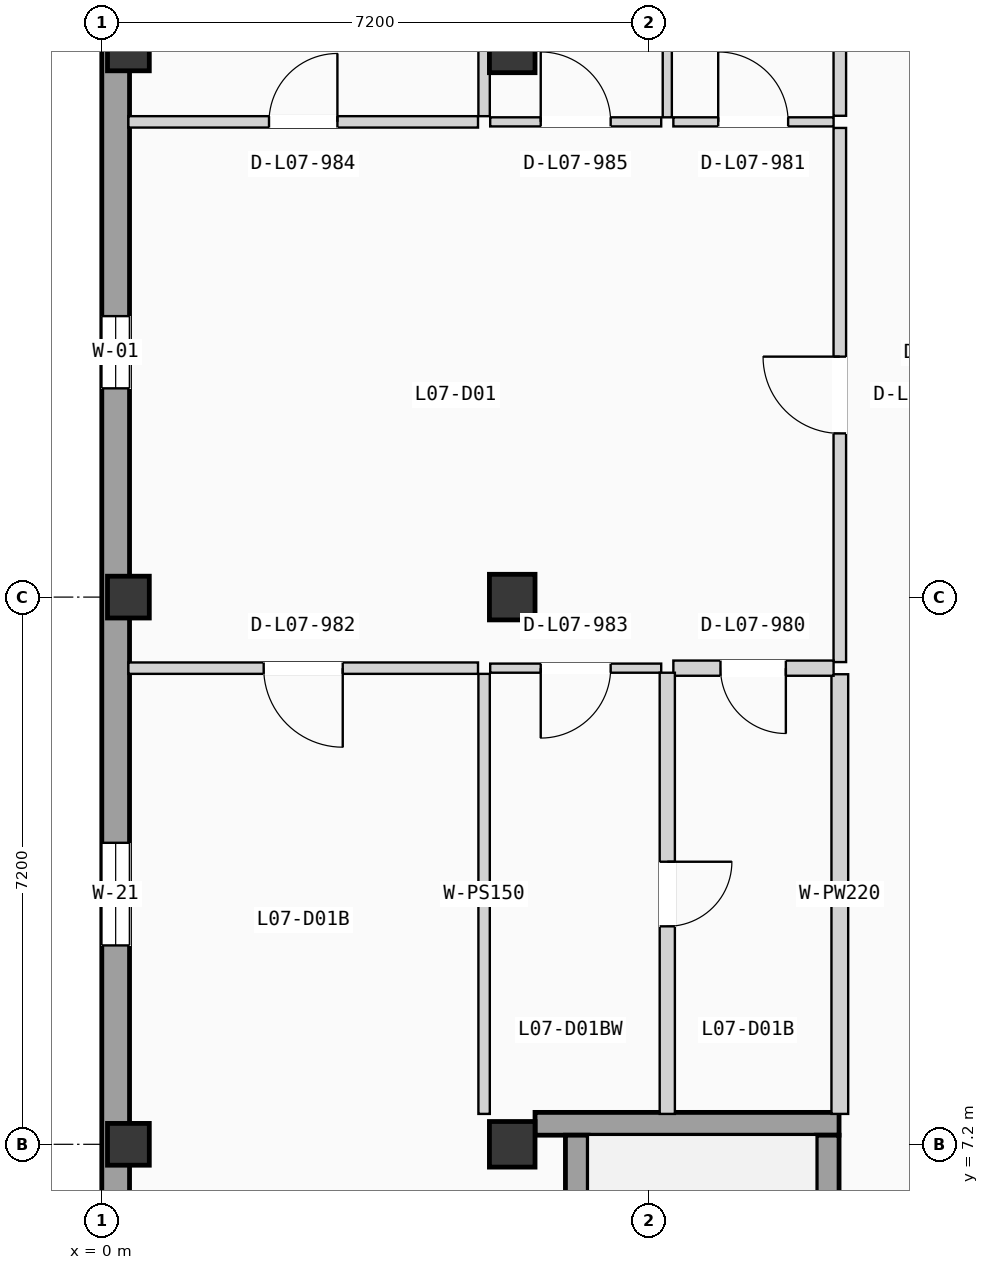
"""IFC4 building model, lengths in metres.
Left out: names, types, materials, properties, quantities, classifications, styles, units other than length and angle.
Written with IfcOpenShell. Run it as: python <this file> out.ifc"""

import sys

from ifc_helpers import new_model, si_unit, direction, frame, frame_2d, origin, origin_2d, place, context, subcontext, project, spatial, rectangle, extrude, element, fill, save


model = new_model("IFC4")
c1 = context("Model", 3, precision=1e-05, world=origin(), true_north=direction((0.0, 1.0)))
c2 = subcontext(c1, "Body", "Model", "MODEL_VIEW")
j1 = project(units=[si_unit("LENGTHUNIT", "METRE"), si_unit("PLANEANGLEUNIT", "RADIAN")], contexts=[c1])
p1 = place(None, origin())
s1 = spatial("IfcSite", under=j1, at=p1, CompositionType="ELEMENT")
p2 = place(p1, origin())
s2 = spatial("IfcBuilding", under=s1, at=p2, CompositionType="ELEMENT")
p3 = place(p2, frame((0.0, 0.0, 24.675)))
s3 = spatial("IfcBuildingStorey", under=s2, at=p3, CompositionType="ELEMENT", Elevation=24.675)
for number, where, z_axis, x_axis in (
    (1, (0.35, 7.2, 0.0), (0.0, 0.0, 1.0), (1.0, 0.0, 0.0)),
    (2, (0.35, 14.4, 0.0), (0.0, 0.0, 1.0), (1.0, 0.0, 0.0)),
    (3, (0.35, 21.6, 0.0), (0.0, 0.0, 1.0), (1.0, 0.0, 0.0)),
):
    element("IfcColumn", number, at=place(p3, frame(where, z_axis=z_axis, x_axis=x_axis)), inside=s3, PredefinedType="COLUMN", context=c2, shape_type="SweptSolid", body=[
        extrude(rectangle(XDim=0.55, YDim=0.55, at=origin_2d()), origin(), (0.0, 0.0, 1.0), 3.15),
    ])
for number, where, z_axis, x_axis in (
    (4, (5.4, 7.2, 0.0), (0.0, 0.0, 1.0), (1.0, 0.0, 0.0)),
    (5, (5.4, 14.4, 0.0), (0.0, 0.0, 1.0), (1.0, 0.0, 0.0)),
    (6, (5.4, 21.6, 0.0), (0.0, 0.0, 1.0), (1.0, 0.0, 0.0)),
):
    element("IfcColumn", number, at=place(p3, frame(where, z_axis=z_axis, x_axis=x_axis)), inside=s3, PredefinedType="COLUMN", context=c2, shape_type="SweptSolid", body=[
        extrude(rectangle(XDim=0.6, YDim=0.6, at=origin_2d()), origin(), (0.0, 0.0, 1.0), 3.15),
    ])
p4 = place(p3, frame((0.183, 0.365, 0.0), z_axis=(0.0, 0.0, 1.0), x_axis=(0.0, 1.0, 0.0)))
e7 = element("IfcWall", 7, at=p4, inside=s3, PredefinedType="SOLIDWALL", context=c2, shape_type="SweptSolid", body=[
    extrude(rectangle(XDim=49.67, YDim=0.365, at=frame_2d((24.835, 0.0))), origin(), (0.0, 0.0, 1.0), 2.6),
])
p5 = place(p4, frame((16.782, 0.0, 0.85)))
e8 = element("IfcOpeningElement", 8, at=p5, cuts=e7, PredefinedType="OPENING", context=c2, shape_type="SweptSolid", body=[
    extrude(rectangle(XDim=0.95, YDim=1.2, at=frame_2d((0.475, 0.6))), frame((0.0, 0.192, 0.0), z_axis=(0.0, -1.0, 0.0), x_axis=(1.0, 0.0, 0.0)), (0.0, 0.0, 1.0), 0.385),
])
p6 = place(p4, frame((9.452, 0.0, 0.9)))
e9 = element("IfcOpeningElement", 9, at=p6, cuts=e7, PredefinedType="OPENING", context=c2, shape_type="SweptSolid", body=[
    extrude(rectangle(XDim=1.35, YDim=1.2, at=frame_2d((0.675, 0.6))), frame((0.0, 0.192, 0.0), z_axis=(0.0, -1.0, 0.0), x_axis=(1.0, 0.0, 0.0)), (0.0, 0.0, 1.0), 0.385),
])
p7 = place(p4, frame((23.154, 0.0, 0.815)))
e10 = element("IfcOpeningElement", 10, at=p7, cuts=e7, PredefinedType="OPENING", context=c2, shape_type="SweptSolid", body=[
    extrude(rectangle(XDim=1.35, YDim=1.35, at=frame_2d((0.675, 0.675))), frame((0.0, 0.192, 0.0), z_axis=(0.0, -1.0, 0.0), x_axis=(1.0, 0.0, 0.0)), (0.0, 0.0, 1.0), 0.385),
])
p8 = place(p4, frame((32.71, 0.0, 0.665)))
e11 = element("IfcOpeningElement", 11, at=p8, cuts=e7, PredefinedType="OPENING", context=c2, shape_type="SweptSolid", body=[
    extrude(rectangle(XDim=1.35, YDim=1.5, at=frame_2d((0.675, 0.75))), frame((0.0, 0.192, 0.0), z_axis=(0.0, -1.0, 0.0), x_axis=(1.0, 0.0, 0.0)), (0.0, 0.0, 1.0), 0.385),
])
p9 = place(p4, frame((29.3, 0.0, 0.515)))
e12 = element("IfcOpeningElement", 12, at=p9, cuts=e7, PredefinedType="OPENING", context=c2, shape_type="SweptSolid", body=[
    extrude(rectangle(XDim=1.35, YDim=1.65, at=frame_2d((0.675, 0.825))), frame((0.0, 0.192, 0.0), z_axis=(0.0, -1.0, 0.0), x_axis=(1.0, 0.0, 0.0)), (0.0, 0.0, 1.0), 0.385),
])
p10 = place(p4, frame((39.504, 0.0, 0.85)))
e13 = element("IfcOpeningElement", 13, at=p10, cuts=e7, PredefinedType="OPENING", context=c2, shape_type="SweptSolid", body=[
    extrude(rectangle(XDim=0.95, YDim=1.2, at=frame_2d((0.475, 0.6))), frame((0.0, 0.192, 0.0), z_axis=(0.0, -1.0, 0.0), x_axis=(1.0, 0.0, 0.0)), (0.0, 0.0, 1.0), 0.385),
])
p11 = place(p3, frame((5.7, 7.47, 0.0), z_axis=(0.0, 0.0, 1.0), x_axis=(1.0, 0.0, 0.0)))
e14 = element("IfcWall", 14, at=p11, inside=s3, PredefinedType="SHEAR", context=c2, shape_type="SweptSolid", body=[
    extrude(rectangle(XDim=4.0, YDim=0.3, at=frame_2d((2.0, 0.0))), origin(), (0.0, 0.0, 1.0), 2.9),
])
p12 = place(p3, frame((6.25, 0.32, 0.0), z_axis=(0.0, 0.0, 1.0), x_axis=(0.0, 1.0, 0.0)))
e15 = element("IfcWall", 15, at=p12, inside=s3, PredefinedType="SHEAR", context=c2, shape_type="SweptSolid", body=[
    extrude(rectangle(XDim=7.0, YDim=0.3, at=frame_2d((3.5, 0.0))), origin(), (0.0, 0.0, 1.0), 2.9),
])
p13 = place(p3, frame((9.55, 0.32, 0.0), z_axis=(0.0, 0.0, 1.0), x_axis=(0.0, 1.0, 0.0)))
e16 = element("IfcWall", 16, at=p13, inside=s3, PredefinedType="SHEAR", context=c2, shape_type="SweptSolid", body=[
    extrude(rectangle(XDim=7.0, YDim=0.3, at=frame_2d((3.5, 0.0))), origin(), (0.0, 0.0, 1.0), 2.9),
])
p14 = place(p13, frame((0.225, 0.0, 0.0)))
e17 = element("IfcOpeningElement", 17, at=p14, cuts=e16, PredefinedType="OPENING", context=c2, shape_type="SweptSolid", body=[
    extrude(rectangle(XDim=1.15, YDim=2.12, at=frame_2d((0.575, 1.06))), frame((0.0, 0.16, 0.0), z_axis=(0.0, -1.0, 0.0), x_axis=(1.0, 0.0, 0.0)), (0.0, 0.0, 1.0), 0.32),
])
p15 = place(p3, frame((9.71, 13.545, 0.0), z_axis=(0.0, 0.0, 1.0), x_axis=(0.0, 1.0, 0.0)))
e18 = element("IfcWall", 18, at=p15, inside=s3, PredefinedType="PARTITIONING", context=c2, shape_type="SweptSolid", body=[
    extrude(rectangle(XDim=7.028, YDim=0.165, at=frame_2d((3.514, 0.0))), origin(), (0.0, 0.0, 1.0), 2.87),
])
p16 = place(p15, frame((3.009, 0.0, 0.0)))
e19 = element("IfcOpeningElement", 19, at=p16, cuts=e18, PredefinedType="OPENING", context=c2, shape_type="SweptSolid", body=[
    extrude(rectangle(XDim=1.01, YDim=2.11, at=frame_2d((0.505, 1.055))), frame((0.0, 0.093, 0.0), z_axis=(0.0, -1.0, 0.0), x_axis=(1.0, 0.0, 0.0)), (0.0, 0.0, 1.0), 0.185),
])
p17 = place(p3, frame((9.71, 7.6, 0.0), z_axis=(0.0, 0.0, 1.0), x_axis=(0.0, 1.0, 0.0)))
e20 = element("IfcWall", 20, at=p17, inside=s3, PredefinedType="PLUMBINGWALL", context=c2, shape_type="SweptSolid", body=[
    extrude(rectangle(XDim=5.785, YDim=0.22, at=frame_2d((2.893, 0.0))), origin(), (0.0, 0.0, 1.0), 2.87),
])
p18 = place(p3, frame((9.71, 20.733, 0.0), z_axis=(0.0, 0.0, 1.0), x_axis=(0.0, 1.0, 0.0)))
e21 = element("IfcWall", 21, at=p18, inside=s3, PredefinedType="PARTITIONING", context=c2, shape_type="SweptSolid", body=[
    extrude(rectangle(XDim=5.785, YDim=0.165, at=frame_2d((2.893, 0.0))), origin(), (0.0, 0.0, 1.0), 2.87),
])
p19 = place(p3, frame((7.52, 13.465, 0.0), z_axis=(0.0, 0.0, 1.0), x_axis=(1.0, 0.0, 0.0)))
e22 = element("IfcWall", 22, at=p19, inside=s3, PredefinedType="PLUMBINGWALL", context=c2, shape_type="SweptSolid", body=[
    extrude(rectangle(XDim=2.108, YDim=0.2, at=frame_2d((1.054, 0.0))), origin(), (0.0, 0.0, 1.0), 2.87),
])
p20 = place(p19, frame((0.62, 0.0, 0.0)))
e23 = element("IfcOpeningElement", 23, at=p20, cuts=e22, PredefinedType="OPENING", context=c2, shape_type="SweptSolid", body=[
    extrude(rectangle(XDim=0.86, YDim=2.0, at=frame_2d((0.43, 1.0))), frame((0.0, 0.11, 0.0), z_axis=(0.0, -1.0, 0.0), x_axis=(1.0, 0.0, 0.0)), (0.0, 0.0, 1.0), 0.22),
])
p21 = place(p3, frame((7.52, 20.653, 0.0), z_axis=(0.0, 0.0, 1.0), x_axis=(1.0, 0.0, 0.0)))
e24 = element("IfcWall", 24, at=p21, inside=s3, PredefinedType="PARTITIONING", context=c2, shape_type="SweptSolid", body=[
    extrude(rectangle(XDim=2.108, YDim=0.12, at=frame_2d((1.054, 0.0))), origin(), (0.0, 0.0, 1.0), 2.87),
])
p22 = place(p21, frame((0.59, 0.0, 0.0)))
e25 = element("IfcOpeningElement", 25, at=p22, cuts=e24, PredefinedType="OPENING", context=c2, shape_type="SweptSolid", body=[
    extrude(rectangle(XDim=0.92, YDim=2.02, at=frame_2d((0.46, 1.01))), frame((0.0, 0.07, 0.0), z_axis=(0.0, -1.0, 0.0), x_axis=(1.0, 0.0, 0.0)), (0.0, 0.0, 1.0), 0.14),
])
p23 = place(p3, frame((0.35, 13.465, 0.0), z_axis=(0.0, 0.0, 1.0), x_axis=(1.0, 0.0, 0.0)))
e26 = element("IfcWall", 26, at=p23, inside=s3, PredefinedType="PARTITIONING", context=c2, shape_type="SweptSolid", body=[
    extrude(rectangle(XDim=4.6, YDim=0.15, at=frame_2d((2.3, 0.0))), origin(), (0.0, 0.0, 1.0), 2.87),
])
p24 = place(p23, frame((1.78, 0.0, 0.0)))
e27 = element("IfcOpeningElement", 27, at=p24, cuts=e26, PredefinedType="OPENING", context=c2, shape_type="SweptSolid", body=[
    extrude(rectangle(XDim=1.04, YDim=2.08, at=frame_2d((0.52, 1.04))), frame((0.0, 0.085, 0.0), z_axis=(0.0, -1.0, 0.0), x_axis=(1.0, 0.0, 0.0)), (0.0, 0.0, 1.0), 0.17),
])
p25 = place(p3, frame((5.11, 13.465, 0.0), z_axis=(0.0, 0.0, 1.0), x_axis=(1.0, 0.0, 0.0)))
e28 = element("IfcWall", 28, at=p25, inside=s3, PredefinedType="PARTITIONING", context=c2, shape_type="SweptSolid", body=[
    extrude(rectangle(XDim=2.25, YDim=0.12, at=frame_2d((1.125, 0.0))), origin(), (0.0, 0.0, 1.0), 2.87),
])
p26 = place(p25, frame((0.665, 0.0, 0.0)))
e29 = element("IfcOpeningElement", 29, at=p26, cuts=e28, PredefinedType="OPENING", context=c2, shape_type="SweptSolid", body=[
    extrude(rectangle(XDim=0.92, YDim=2.02, at=frame_2d((0.46, 1.01))), frame((0.0, 0.07, 0.0), z_axis=(0.0, -1.0, 0.0), x_axis=(1.0, 0.0, 0.0)), (0.0, 0.0, 1.0), 0.14),
])
p27 = place(p3, frame((0.35, 20.653, 0.0), z_axis=(0.0, 0.0, 1.0), x_axis=(1.0, 0.0, 0.0)))
e30 = element("IfcWall", 30, at=p27, inside=s3, PredefinedType="PARTITIONING", context=c2, shape_type="SweptSolid", body=[
    extrude(rectangle(XDim=4.6, YDim=0.15, at=frame_2d((2.3, 0.0))), origin(), (0.0, 0.0, 1.0), 2.87),
])
p28 = place(p27, frame((1.85, 0.0, 0.0)))
e31 = element("IfcOpeningElement", 31, at=p28, cuts=e30, PredefinedType="OPENING", context=c2, shape_type="SweptSolid", body=[
    extrude(rectangle(XDim=0.9, YDim=2.04, at=frame_2d((0.45, 1.02))), frame((0.0, 0.085, 0.0), z_axis=(0.0, -1.0, 0.0), x_axis=(1.0, 0.0, 0.0)), (0.0, 0.0, 1.0), 0.17),
])
p29 = place(p3, frame((5.11, 20.653, 0.0), z_axis=(0.0, 0.0, 1.0), x_axis=(1.0, 0.0, 0.0)))
e32 = element("IfcWall", 32, at=p29, inside=s3, PredefinedType="PARTITIONING", context=c2, shape_type="SweptSolid", body=[
    extrude(rectangle(XDim=2.25, YDim=0.12, at=frame_2d((1.125, 0.0))), origin(), (0.0, 0.0, 1.0), 2.87),
])
p30 = place(p29, frame((0.665, 0.0, 0.0)))
e33 = element("IfcOpeningElement", 33, at=p30, cuts=e32, PredefinedType="OPENING", context=c2, shape_type="SweptSolid", body=[
    extrude(rectangle(XDim=0.92, YDim=2.02, at=frame_2d((0.46, 1.01))), frame((0.0, 0.07, 0.0), z_axis=(0.0, -1.0, 0.0), x_axis=(1.0, 0.0, 0.0)), (0.0, 0.0, 1.0), 0.14),
])
p31 = place(p3, frame((7.44, 7.6, 0.0), z_axis=(0.0, 0.0, 1.0), x_axis=(0.0, 1.0, 0.0)))
e34 = element("IfcWall", 34, at=p31, inside=s3, PredefinedType="PLUMBINGWALL", context=c2, shape_type="SweptSolid", body=[
    extrude(rectangle(XDim=5.805, YDim=0.2, at=frame_2d((2.902, 0.0))), origin(), (0.0, 0.0, 1.0), 2.87),
])
p32 = place(p31, frame((2.468, 0.0, 0.0)))
e35 = element("IfcOpeningElement", 35, at=p32, cuts=e34, PredefinedType="OPENING", context=c2, shape_type="SweptSolid", body=[
    extrude(rectangle(XDim=0.85, YDim=2.01, at=frame_2d((0.425, 1.005))), frame((0.0, 0.11, 0.0), z_axis=(0.0, -1.0, 0.0), x_axis=(1.0, 0.0, 0.0)), (0.0, 0.0, 1.0), 0.22),
])
p33 = place(p3, frame((7.44, 20.713, 0.0), z_axis=(0.0, 0.0, 1.0), x_axis=(0.0, 1.0, 0.0)))
e36 = element("IfcWall", 36, at=p33, inside=s3, PredefinedType="PARTITIONING", context=c2, shape_type="SweptSolid", body=[
    extrude(rectangle(XDim=5.805, YDim=0.12, at=frame_2d((2.903, 0.0))), origin(), (0.0, 0.0, 1.0), 2.87),
])
p34 = place(p3, frame((5.03, 7.6, 0.0), z_axis=(0.0, 0.0, 1.0), x_axis=(0.0, 1.0, 0.0)))
e37 = element("IfcWall", 37, at=p34, inside=s3, PredefinedType="PARTITIONING", context=c2, shape_type="SweptSolid", body=[
    extrude(rectangle(XDim=5.79, YDim=0.15, at=frame_2d((2.895, 0.0))), origin(), (0.0, 0.0, 1.0), 2.87),
])
p35 = place(p3, frame((5.03, 20.728, 0.0), z_axis=(0.0, 0.0, 1.0), x_axis=(0.0, 1.0, 0.0)))
e38 = element("IfcWall", 38, at=p35, inside=s3, PredefinedType="PARTITIONING", context=c2, shape_type="SweptSolid", body=[
    extrude(rectangle(XDim=5.79, YDim=0.15, at=frame_2d((2.895, 0.0))), origin(), (0.0, 0.0, 1.0), 2.87),
])
p36 = place(p5, origin())
e39 = element("IfcWindow", 39, at=p36, inside=s3, PartitioningType="SINGLE_PANEL", PredefinedType="WINDOW", context=c2, shape_type="SweptSolid", body=[
    extrude(rectangle(XDim=0.95, YDim=1.2, at=frame_2d((0.475, 0.6))), frame((0.0, 0.03, 0.0), z_axis=(0.0, -1.0, 0.0), x_axis=(1.0, 0.0, 0.0)), (0.0, 0.0, 1.0), 0.06),
])
fill(e8, e39)
p37 = place(p6, origin())
e40 = element("IfcWindow", 40, at=p37, inside=s3, PartitioningType="SINGLE_PANEL", PredefinedType="WINDOW", context=c2, shape_type="SweptSolid", body=[
    extrude(rectangle(XDim=1.35, YDim=1.2, at=frame_2d((0.675, 0.6))), frame((0.0, 0.03, 0.0), z_axis=(0.0, -1.0, 0.0), x_axis=(1.0, 0.0, 0.0)), (0.0, 0.0, 1.0), 0.06),
])
fill(e9, e40)
p38 = place(p16, origin())
e41 = element("IfcDoor", 41, at=p38, inside=s3, OperationType="SINGLE_SWING_RIGHT", PredefinedType="DOOR", context=c2, shape_type="SweptSolid", body=[
    extrude(rectangle(XDim=1.01, YDim=2.11, at=frame_2d((0.505, 1.055))), frame((0.0, 0.025, 0.0), z_axis=(0.0, -1.0, 0.0), x_axis=(1.0, 0.0, 0.0)), (0.0, 0.0, 1.0), 0.05),
])
fill(e19, e41)
p39 = place(p20, frame((0.86, 0.0, 0.0), z_axis=(0.0, 0.0, 1.0), x_axis=(-1.0, 0.0, 0.0)))
e42 = element("IfcDoor", 42, at=p39, inside=s3, OperationType="SINGLE_SWING_RIGHT", PredefinedType="DOOR", context=c2, shape_type="SweptSolid", body=[
    extrude(rectangle(XDim=0.86, YDim=2.0, at=frame_2d((0.43, 1.0))), frame((0.0, 0.025, 0.0), z_axis=(0.0, -1.0, 0.0), x_axis=(1.0, 0.0, 0.0)), (0.0, 0.0, 1.0), 0.05),
])
fill(e23, e42)
p40 = place(p22, origin())
e43 = element("IfcDoor", 43, at=p40, inside=s3, OperationType="SINGLE_SWING_LEFT", PredefinedType="DOOR", context=c2, shape_type="SweptSolid", body=[
    extrude(rectangle(XDim=0.92, YDim=2.02, at=frame_2d((0.46, 1.01))), frame((0.0, 0.025, 0.0), z_axis=(0.0, -1.0, 0.0), x_axis=(1.0, 0.0, 0.0)), (0.0, 0.0, 1.0), 0.05),
])
fill(e25, e43)
p41 = place(p24, frame((1.04, 0.0, 0.0), z_axis=(0.0, 0.0, 1.0), x_axis=(-1.0, 0.0, 0.0)))
e44 = element("IfcDoor", 44, at=p41, inside=s3, OperationType="SINGLE_SWING_RIGHT", PredefinedType="DOOR", context=c2, shape_type="SweptSolid", body=[
    extrude(rectangle(XDim=1.04, YDim=2.08, at=frame_2d((0.52, 1.04))), frame((0.0, 0.025, 0.0), z_axis=(0.0, -1.0, 0.0), x_axis=(1.0, 0.0, 0.0)), (0.0, 0.0, 1.0), 0.05),
])
fill(e27, e44)
p42 = place(p26, frame((0.92, 0.0, 0.0), z_axis=(0.0, 0.0, 1.0), x_axis=(-1.0, 0.0, 0.0)))
e45 = element("IfcDoor", 45, at=p42, inside=s3, OperationType="SINGLE_SWING_LEFT", PredefinedType="DOOR", context=c2, shape_type="SweptSolid", body=[
    extrude(rectangle(XDim=0.92, YDim=2.02, at=frame_2d((0.46, 1.01))), frame((0.0, 0.025, 0.0), z_axis=(0.0, -1.0, 0.0), x_axis=(1.0, 0.0, 0.0)), (0.0, 0.0, 1.0), 0.05),
])
fill(e29, e45)
p43 = place(p28, origin())
e46 = element("IfcDoor", 46, at=p43, inside=s3, OperationType="SINGLE_SWING_RIGHT", PredefinedType="DOOR", context=c2, shape_type="SweptSolid", body=[
    extrude(rectangle(XDim=0.9, YDim=2.04, at=frame_2d((0.45, 1.02))), frame((0.0, 0.025, 0.0), z_axis=(0.0, -1.0, 0.0), x_axis=(1.0, 0.0, 0.0)), (0.0, 0.0, 1.0), 0.05),
])
fill(e31, e46)
p44 = place(p30, origin())
e47 = element("IfcDoor", 47, at=p44, inside=s3, OperationType="SINGLE_SWING_LEFT", PredefinedType="DOOR", context=c2, shape_type="SweptSolid", body=[
    extrude(rectangle(XDim=0.92, YDim=2.02, at=frame_2d((0.46, 1.01))), frame((0.0, 0.025, 0.0), z_axis=(0.0, -1.0, 0.0), x_axis=(1.0, 0.0, 0.0)), (0.0, 0.0, 1.0), 0.05),
])
fill(e33, e47)
p45 = place(p32, frame((0.85, 0.0, 0.0), z_axis=(0.0, 0.0, 1.0), x_axis=(-1.0, 0.0, 0.0)))
e48 = element("IfcDoor", 48, at=p45, inside=s3, OperationType="SINGLE_SWING_RIGHT", PredefinedType="DOOR", context=c2, shape_type="SweptSolid", body=[
    extrude(rectangle(XDim=0.85, YDim=2.01, at=frame_2d((0.425, 1.005))), frame((0.0, 0.025, 0.0), z_axis=(0.0, -1.0, 0.0), x_axis=(1.0, 0.0, 0.0)), (0.0, 0.0, 1.0), 0.05),
])
fill(e35, e48)
save(model, sys.argv[1])
